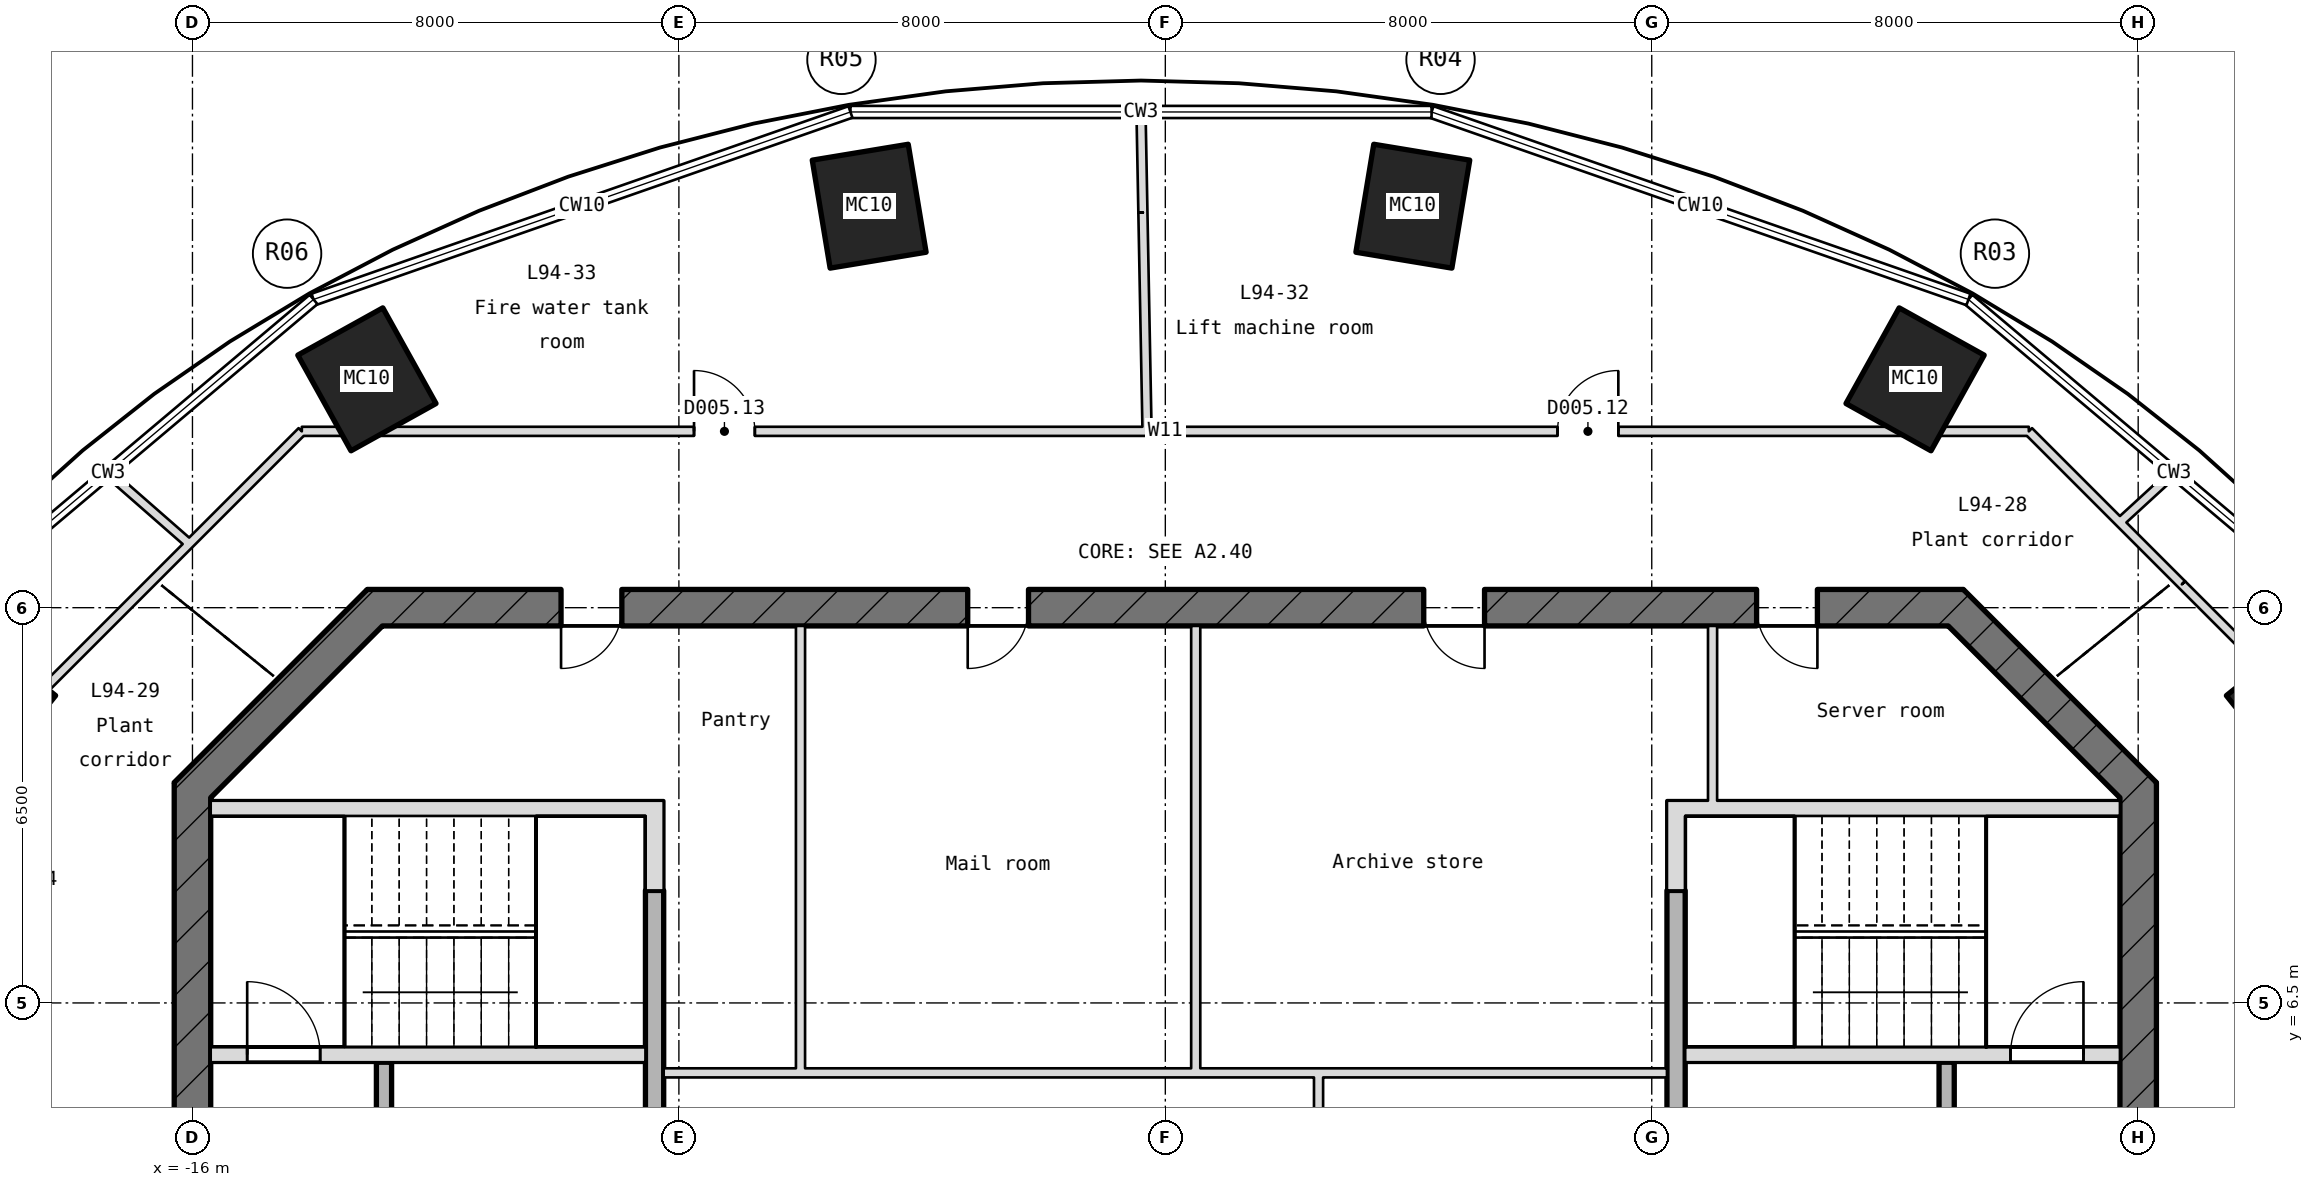
"""IFC4 building model, lengths in metres.
Left out: names, types, materials, properties, quantities, classifications, styles, units other than length and angle.
Written with IfcOpenShell. Run it as: python <this file> out.ifc"""

import sys

from ifc_helpers import new_model, si_unit, direction, frame, frame_2d, origin, origin_2d, place, context, subcontext, project, spatial, rectangle, hollow_rectangle, extrude, element, fill, save


model = new_model("IFC4")
c1 = context("Model", 3, precision=1e-05, world=origin(), true_north=direction((0.0, 1.0)))
c2 = subcontext(c1, "Body", "Model", "MODEL_VIEW")
j1 = project(units=[si_unit("LENGTHUNIT", "METRE"), si_unit("PLANEANGLEUNIT", "RADIAN")], contexts=[c1])
p1 = place(None, origin())
s1 = spatial("IfcSite", under=j1, at=p1, CompositionType="ELEMENT")
p2 = place(p1, origin())
s2 = spatial("IfcBuilding", under=s1, at=p2, CompositionType="ELEMENT")
p3 = place(p2, frame((0.0, 0.0, 418.55)))
s3 = spatial("IfcBuildingStorey", under=s2, at=p3, CompositionType="ELEMENT", Elevation=418.55)
for number, where, z_axis, x_axis in (
    (1, (18.653, 11.494, -0.2), (0.0, 0.0, 1.0), (0.626, -0.78, 0.0)),
    (2, (12.331, 16.755, -0.2), (0.0, 0.0, 1.0), (0.874, -0.486, 0.0)),
    (3, (4.071, 19.603, -0.2), (0.0, 0.0, 1.0), (0.987, -0.163, 0.0)),
    (4, (-4.871, 19.603, -0.2), (0.0, 0.0, 1.0), (0.987, 0.163, 0.0)),
    (5, (-13.131, 16.755, -0.2), (0.0, 0.0, 1.0), (0.874, 0.486, 0.0)),
    (6, (-19.453, 11.494, -0.2), (0.0, 0.0, 1.0), (0.626, 0.78, 0.0)),
):
    element("IfcColumn", number, at=place(p3, frame(where, z_axis=z_axis, x_axis=x_axis)), inside=s3, PredefinedType="COLUMN", context=c2, shape_type="SweptSolid", body=[
        extrude(hollow_rectangle(XDim=1.6, YDim=1.8, WallThickness=0.045, at=origin_2d()), origin(), (0.0, 0.0, 1.0), 4.9),
    ])
p4 = place(p3, frame((16.0, -10.124, -0.2), z_axis=(0.0, 0.0, 1.0), x_axis=(0.0, 1.0, 0.0)))
e7 = element("IfcWall", 7, at=p4, inside=s3, PredefinedType="SHEAR", context=c2, shape_type="SweptSolid", body=[
    extrude(rectangle(XDim=20.249, YDim=0.6, at=frame_2d((10.124, 0.0))), origin(), (0.0, 0.0, 1.0), 4.9),
])
p5 = place(p4, frame((8.924, 0.0, 0.2)))
e8 = element("IfcOpeningElement", 8, at=p5, cuts=e7, PredefinedType="OPENING", context=c2, shape_type="SweptSolid", body=[
    extrude(rectangle(XDim=2.4, YDim=2.1, at=frame_2d((1.2, 1.05))), frame((0.0, 0.31, 0.0), z_axis=(0.0, -1.0, 0.0), x_axis=(1.0, 0.0, 0.0)), (0.0, 0.0, 1.0), 0.62),
])
p6 = place(p4, frame((13.524, 0.0, 0.2)))
e9 = element("IfcOpeningElement", 9, at=p6, cuts=e7, PredefinedType="OPENING", context=c2, shape_type="SweptSolid", body=[
    extrude(rectangle(XDim=1.2, YDim=2.1, at=frame_2d((0.6, 1.05))), frame((0.0, 0.31, 0.0), z_axis=(0.0, -1.0, 0.0), x_axis=(1.0, 0.0, 0.0)), (0.0, 0.0, 1.0), 0.62),
])
p7 = place(p4, frame((2.4, 0.0, 0.2)))
e10 = element("IfcOpeningElement", 10, at=p7, cuts=e7, PredefinedType="OPENING", context=c2, shape_type="SweptSolid", body=[
    extrude(rectangle(XDim=1.2, YDim=2.1, at=frame_2d((0.6, 1.05))), frame((0.0, 0.31, 0.0), z_axis=(0.0, -1.0, 0.0), x_axis=(1.0, 0.0, 0.0)), (0.0, 0.0, 1.0), 0.62),
])
p8 = place(p3, frame((16.088, 9.912, -0.2), z_axis=(0.0, 0.0, 1.0), x_axis=(-0.707106781187, 0.707106781187, 0.0)))
e11 = element("IfcWall", 11, at=p8, inside=s3, PredefinedType="SHEAR", context=c2, shape_type="SweptSolid", body=[
    extrude(rectangle(XDim=4.491, YDim=0.6, at=frame_2d((2.246, 0.0))), origin(), (0.0, 0.0, 1.0), 4.9),
])
p9 = place(p3, frame((13.124, 13.0, -0.2), z_axis=(0.0, 0.0, 1.0), x_axis=(-1.0, 0.0, 0.0)))
e12 = element("IfcWall", 12, at=p9, inside=s3, PredefinedType="SHEAR", context=c2, shape_type="SweptSolid", body=[
    extrude(rectangle(XDim=26.249, YDim=0.6, at=frame_2d((13.124, 0.0))), origin(), (0.0, 0.0, 1.0), 4.9),
])
p10 = place(p9, frame((22.062, 0.0, 0.2)))
e13 = element("IfcOpeningElement", 13, at=p10, cuts=e12, PredefinedType="OPENING", context=c2, shape_type="SweptSolid", body=[
    extrude(rectangle(XDim=1.0, YDim=2.1, at=frame_2d((0.5, 1.05))), frame((0.0, 0.31, 0.0), z_axis=(0.0, -1.0, 0.0), x_axis=(1.0, 0.0, 0.0)), (0.0, 0.0, 1.0), 0.62),
])
p11 = place(p9, frame((15.374, 0.0, 0.2)))
e14 = element("IfcOpeningElement", 14, at=p11, cuts=e12, PredefinedType="OPENING", context=c2, shape_type="SweptSolid", body=[
    extrude(rectangle(XDim=1.0, YDim=2.1, at=frame_2d((0.5, 1.05))), frame((0.0, 0.31, 0.0), z_axis=(0.0, -1.0, 0.0), x_axis=(1.0, 0.0, 0.0)), (0.0, 0.0, 1.0), 0.62),
])
p12 = place(p9, frame((7.874, 0.0, 0.2)))
e15 = element("IfcOpeningElement", 15, at=p12, cuts=e12, PredefinedType="OPENING", context=c2, shape_type="SweptSolid", body=[
    extrude(rectangle(XDim=1.0, YDim=2.1, at=frame_2d((0.5, 1.05))), frame((0.0, 0.31, 0.0), z_axis=(0.0, -1.0, 0.0), x_axis=(1.0, 0.0, 0.0)), (0.0, 0.0, 1.0), 0.62),
])
p13 = place(p9, frame((2.4, 0.0, 0.2)))
e16 = element("IfcOpeningElement", 16, at=p13, cuts=e12, PredefinedType="OPENING", context=c2, shape_type="SweptSolid", body=[
    extrude(rectangle(XDim=1.0, YDim=2.1, at=frame_2d((0.5, 1.05))), frame((0.0, 0.31, 0.0), z_axis=(0.0, -1.0, 0.0), x_axis=(1.0, 0.0, 0.0)), (0.0, 0.0, 1.0), 0.62),
])
p14 = place(p3, frame((-12.912, 13.088, -0.2), z_axis=(0.0, 0.0, 1.0), x_axis=(-0.707106781187, -0.707106781187, 0.0)))
e17 = element("IfcWall", 17, at=p14, inside=s3, PredefinedType="SHEAR", context=c2, shape_type="SweptSolid", body=[
    extrude(rectangle(XDim=4.491, YDim=0.6, at=frame_2d((2.246, 0.0))), origin(), (0.0, 0.0, 1.0), 4.9),
])
p15 = place(p3, frame((-16.0, 10.124, -0.2), z_axis=(0.0, 0.0, 1.0), x_axis=(0.0, -1.0, 0.0)))
e18 = element("IfcWall", 18, at=p15, inside=s3, PredefinedType="SHEAR", context=c2, shape_type="SweptSolid", body=[
    extrude(rectangle(XDim=20.249, YDim=0.6, at=frame_2d((10.124, 0.0))), origin(), (0.0, 0.0, 1.0), 4.9),
])
p16 = place(p15, frame((8.924, 0.0, 0.2)))
e19 = element("IfcOpeningElement", 19, at=p16, cuts=e18, PredefinedType="OPENING", context=c2, shape_type="SweptSolid", body=[
    extrude(rectangle(XDim=2.4, YDim=2.1, at=frame_2d((1.2, 1.05))), frame((0.0, 0.31, 0.0), z_axis=(0.0, -1.0, 0.0), x_axis=(1.0, 0.0, 0.0)), (0.0, 0.0, 1.0), 0.62),
])
p17 = place(p15, frame((5.524, 0.0, 0.2)))
e20 = element("IfcOpeningElement", 20, at=p17, cuts=e18, PredefinedType="OPENING", context=c2, shape_type="SweptSolid", body=[
    extrude(rectangle(XDim=1.2, YDim=2.1, at=frame_2d((0.6, 1.05))), frame((0.0, 0.31, 0.0), z_axis=(0.0, -1.0, 0.0), x_axis=(1.0, 0.0, 0.0)), (0.0, 0.0, 1.0), 0.62),
])
p18 = place(p3, frame((-8.25, 5.35, 0.0), z_axis=(0.0, 0.0, 1.0), x_axis=(1.0, 0.0, 0.0)))
e21 = element("IfcWall", 21, at=p18, inside=s3, PredefinedType="PARTITIONING", context=c2, shape_type="SweptSolid", body=[
    extrude(rectangle(XDim=16.5, YDim=0.15, at=frame_2d((8.25, 0.0))), origin(), (0.0, 0.0, 1.0), 4.7),
])
p19 = place(p3, frame((-15.7, 5.65, -0.2), z_axis=(0.0, 0.0, 1.0), x_axis=(1.0, 0.0, 0.0)))
e22 = element("IfcWall", 22, at=p19, inside=s3, PredefinedType="SHEAR", context=c2, shape_type="SweptSolid", body=[
    extrude(rectangle(XDim=7.15, YDim=0.25, at=frame_2d((3.575, 0.0))), origin(), (0.0, 0.0, 1.0), 4.9),
])
p20 = place(p19, frame((0.6, 0.0, 0.2)))
e23 = element("IfcOpeningElement", 23, at=p20, cuts=e22, PredefinedType="OPENING", context=c2, shape_type="SweptSolid", body=[
    extrude(rectangle(XDim=1.2, YDim=2.1, at=frame_2d((0.6, 1.05))), frame((0.0, 0.135, 0.0), z_axis=(0.0, -1.0, 0.0), x_axis=(1.0, 0.0, 0.0)), (0.0, 0.0, 1.0), 0.27),
])
p21 = place(p3, frame((8.55, 5.65, -0.2), z_axis=(0.0, 0.0, 1.0), x_axis=(1.0, 0.0, 0.0)))
e24 = element("IfcWall", 24, at=p21, inside=s3, PredefinedType="SHEAR", context=c2, shape_type="SweptSolid", body=[
    extrude(rectangle(XDim=7.15, YDim=0.25, at=frame_2d((3.575, 0.0))), origin(), (0.0, 0.0, 1.0), 4.9),
])
p22 = place(p21, frame((5.35, 0.0, 0.2)))
e25 = element("IfcOpeningElement", 25, at=p22, cuts=e24, PredefinedType="OPENING", context=c2, shape_type="SweptSolid", body=[
    extrude(rectangle(XDim=1.2, YDim=2.1, at=frame_2d((0.6, 1.05))), frame((0.0, 0.135, 0.0), z_axis=(0.0, -1.0, 0.0), x_axis=(1.0, 0.0, 0.0)), (0.0, 0.0, 1.0), 0.27),
])
for number, where, z_axis, x_axis in (
    (26, (-15.7, 9.7, -0.2), (0.0, 0.0, 1.0), (1.0, 0.0, 0.0)),
    (27, (8.55, 9.7, -0.2), (0.0, 0.0, 1.0), (1.0, 0.0, 0.0)),
):
    element("IfcWall", number, at=place(p3, frame(where, z_axis=z_axis, x_axis=x_axis)), inside=s3, PredefinedType="SHEAR", context=c2, shape_type="SweptSolid", body=[
        extrude(rectangle(XDim=7.15, YDim=0.25, at=frame_2d((3.575, 0.0))), origin(), (0.0, 0.0, 1.0), 4.9),
    ])
p23 = place(p3, frame((-12.85, 2.475, 0.0), z_axis=(0.0, 0.0, 1.0), x_axis=(0.0, 1.0, 0.0)))
e28 = element("IfcWall", 28, at=p23, inside=s3, PredefinedType="STANDARD", context=c2, shape_type="SweptSolid", body=[
    extrude(rectangle(XDim=3.05, YDim=0.25, at=frame_2d((1.525, 0.0))), origin(), (0.0, 0.0, 1.0), 4.7),
])
p24 = place(p3, frame((-8.4, 2.5, -0.2), z_axis=(0.0, 0.0, 1.0), x_axis=(0.0, 1.0, 0.0)))
e29 = element("IfcWall", 29, at=p24, inside=s3, PredefinedType="SHEAR", context=c2, shape_type="SweptSolid", body=[
    extrude(rectangle(XDim=5.85, YDim=0.3, at=frame_2d((2.925, 0.0))), origin(), (0.0, 0.0, 1.0), 4.9),
])
p25 = place(p3, frame((-8.4, 8.35, -0.2), z_axis=(0.0, 0.0, 1.0), x_axis=(0.0, 1.0, 0.0)))
e30 = element("IfcWall", 30, at=p25, inside=s3, PredefinedType="SHEAR", context=c2, shape_type="SweptSolid", body=[
    extrude(rectangle(XDim=1.475, YDim=0.3, at=frame_2d((0.737, 0.0))), origin(), (0.0, 0.0, 1.0), 4.9),
])
for number, where, z_axis, x_axis in (
    (31, (-6.0, 5.425, 0.0), (0.0, 0.0, 1.0), (0.0, 1.0, 0.0)),
    (32, (0.5, 5.425, 0.0), (0.0, 0.0, 1.0), (0.0, 1.0, 0.0)),
):
    element("IfcWall", number, at=place(p3, frame(where, z_axis=z_axis, x_axis=x_axis)), inside=s3, PredefinedType="PARTITIONING", context=c2, shape_type="SweptSolid", body=[
        extrude(rectangle(XDim=7.275, YDim=0.15, at=frame_2d((3.637, 0.0))), origin(), (0.0, 0.0, 1.0), 4.7),
    ])
p26 = place(p3, frame((2.52, 2.5, 0.0), z_axis=(0.0, 0.0, 1.0), x_axis=(0.0, 1.0, 0.0)))
e33 = element("IfcWall", 33, at=p26, inside=s3, PredefinedType="PARTITIONING", context=c2, shape_type="SweptSolid", body=[
    extrude(rectangle(XDim=2.775, YDim=0.15, at=frame_2d((1.387, 0.0))), origin(), (0.0, 0.0, 1.0), 4.7),
])
p27 = place(p3, frame((8.4, 2.5, -0.2), z_axis=(0.0, 0.0, 1.0), x_axis=(0.0, 1.0, 0.0)))
e34 = element("IfcWall", 34, at=p27, inside=s3, PredefinedType="SHEAR", context=c2, shape_type="SweptSolid", body=[
    extrude(rectangle(XDim=5.85, YDim=0.3, at=frame_2d((2.925, 0.0))), origin(), (0.0, 0.0, 1.0), 4.9),
])
p28 = place(p3, frame((8.4, 8.35, -0.2), z_axis=(0.0, 0.0, 1.0), x_axis=(0.0, 1.0, 0.0)))
e35 = element("IfcWall", 35, at=p28, inside=s3, PredefinedType="SHEAR", context=c2, shape_type="SweptSolid", body=[
    extrude(rectangle(XDim=1.475, YDim=0.3, at=frame_2d((0.737, 0.0))), origin(), (0.0, 0.0, 1.0), 4.9),
])
p29 = place(p3, frame((9.0, 9.825, 0.0), z_axis=(0.0, 0.0, 1.0), x_axis=(0.0, 1.0, 0.0)))
e36 = element("IfcWall", 36, at=p29, inside=s3, PredefinedType="PARTITIONING", context=c2, shape_type="SweptSolid", body=[
    extrude(rectangle(XDim=2.875, YDim=0.15, at=frame_2d((1.438, 0.0))), origin(), (0.0, 0.0, 1.0), 4.7),
])
p30 = place(p3, frame((12.85, 2.475, 0.0), z_axis=(0.0, 0.0, 1.0), x_axis=(0.0, 1.0, 0.0)))
e37 = element("IfcWall", 37, at=p30, inside=s3, PredefinedType="STANDARD", context=c2, shape_type="SweptSolid", body=[
    extrude(rectangle(XDim=3.05, YDim=0.25, at=frame_2d((1.525, 0.0))), origin(), (0.0, 0.0, 1.0), 4.7),
])
p31 = place(p3, frame((-14.201, 15.9, 0.0), z_axis=(0.0, 0.0, 1.0), x_axis=(1.0, 0.0, 0.0)))
e38 = element("IfcWall", 38, at=p31, inside=s3, PredefinedType="PARTITIONING", context=c2, shape_type="SweptSolid", body=[
    extrude(rectangle(XDim=28.403, YDim=0.15, at=frame_2d((14.201, 0.0))), origin(), (0.0, 0.0, 1.0), 4.7),
])
p32 = place(p31, frame((20.652, 0.0, 0.0)))
e39 = element("IfcOpeningElement", 39, at=p32, cuts=e38, PredefinedType="OPENING", context=c2, shape_type="SweptSolid", body=[
    extrude(rectangle(XDim=1.0, YDim=2.1, at=frame_2d((0.5, 1.05))), frame((0.0, 0.085, 0.0), z_axis=(0.0, -1.0, 0.0), x_axis=(1.0, 0.0, 0.0)), (0.0, 0.0, 1.0), 0.17),
])
p33 = place(p31, frame((6.45, 0.0, 0.0)))
e40 = element("IfcOpeningElement", 40, at=p33, cuts=e38, PredefinedType="OPENING", context=c2, shape_type="SweptSolid", body=[
    extrude(rectangle(XDim=1.0, YDim=2.1, at=frame_2d((0.5, 1.05))), frame((0.0, 0.085, 0.0), z_axis=(0.0, -1.0, 0.0), x_axis=(1.0, 0.0, 0.0)), (0.0, 0.0, 1.0), 0.17),
])
p34 = place(p3, frame((15.698, 14.404, 0.0), z_axis=(0.0, 0.0, 1.0), x_axis=(0.736966436557, 0.67592933905, 0.0)))
e41 = element("IfcWall", 41, at=p34, inside=s3, PredefinedType="PARTITIONING", context=c2, shape_type="SweptSolid", body=[
    extrude(rectangle(XDim=1.188, YDim=0.15, at=frame_2d((0.594, 0.0))), origin(), (0.0, 0.0, 1.0), 4.7),
])
p35 = place(p3, frame((-18.9, 11.201, 0.0), z_axis=(0.0, 0.0, 1.0), x_axis=(0.707106781187, 0.707106781187, 0.0)))
e42 = element("IfcWall", 42, at=p35, inside=s3, PredefinedType="PARTITIONING", context=c2, shape_type="SweptSolid", body=[
    extrude(rectangle(XDim=3.998, YDim=0.15, at=frame_2d((1.999, 0.0))), origin(), (0.0, 0.0, 1.0), 4.7),
])
p36 = place(p3, frame((-16.073, 14.029, 0.0), z_axis=(0.0, 0.0, 1.0), x_axis=(0.707106781187, 0.707106781187, 0.0)))
e43 = element("IfcWall", 43, at=p36, inside=s3, PredefinedType="PARTITIONING", context=c2, shape_type="SweptSolid", body=[
    extrude(rectangle(XDim=2.646, YDim=0.15, at=frame_2d((1.323, 0.0))), origin(), (0.0, 0.0, 1.0), 4.238),
])
p37 = place(p3, frame((-0.301, 15.9, 0.0), z_axis=(0.0, 0.0, 1.0), x_axis=(-0.018863287148, 0.99982207237, 0.0)))
e44 = element("IfcWall", 44, at=p37, inside=s3, PredefinedType="PARTITIONING", context=c2, shape_type="SweptSolid", body=[
    extrude(rectangle(XDim=3.598, YDim=0.15, at=frame_2d((1.799, 0.0))), origin(), (0.0, 0.0, 1.0), 4.347),
])
p38 = place(p3, frame((-0.369, 19.497, 0.0), z_axis=(0.0, 0.0, 1.0), x_axis=(-0.018963136695, 0.999820183556, 0.0)))
e45 = element("IfcWall", 45, at=p38, inside=s3, PredefinedType="PARTITIONING", context=c2, shape_type="SweptSolid", body=[
    extrude(rectangle(XDim=1.635, YDim=0.15, at=frame_2d((0.817, 0.0))), origin(), (0.0, 0.0, 1.0), 4.7),
])
p39 = place(p3, frame((18.412, 11.689, 0.0), z_axis=(0.0, 0.0, 1.0), x_axis=(-0.707055846068, 0.707157712636, 0.0)))
e46 = element("IfcWall", 46, at=p39, inside=s3, PredefinedType="PARTITIONING", context=c2, shape_type="SweptSolid", body=[
    extrude(rectangle(XDim=2.397, YDim=0.15, at=frame_2d((1.198, 0.0))), origin(), (0.0, 0.0, 1.0), 4.238),
])
p40 = place(p3, frame((16.718, 13.384, 0.0), z_axis=(0.0, 0.0, 1.0), x_axis=(-0.707072476431, 0.707141084278, 0.0)))
e47 = element("IfcWall", 47, at=p40, inside=s3, PredefinedType="PARTITIONING", context=c2, shape_type="SweptSolid", body=[
    extrude(rectangle(XDim=3.559, YDim=0.15, at=frame_2d((1.779, 0.0))), origin(), (0.0, 0.0, 1.0), 4.7),
])
p41 = place(p3, frame((-16.051, 14.05, 0.0), z_axis=(0.0, 0.0, 1.0), x_axis=(-0.75245614782, 0.658642350299, 0.0)))
e48 = element("IfcWall", 48, at=p41, inside=s3, PredefinedType="PARTITIONING", context=c2, shape_type="SweptSolid", body=[
    extrude(rectangle(XDim=1.757, YDim=0.15, at=frame_2d((0.878, 0.0))), origin(), (0.0, 0.0, 1.0), 4.7),
])
p42 = place(p20, origin())
e49 = element("IfcDoor", 49, at=p42, inside=s3, OperationType="SINGLE_SWING_RIGHT", PredefinedType="DOOR", context=c2, shape_type="SweptSolid", body=[
    extrude(rectangle(XDim=1.2, YDim=2.1, at=frame_2d((0.6, 1.05))), frame((0.0, 0.025, 0.0), z_axis=(0.0, -1.0, 0.0), x_axis=(1.0, 0.0, 0.0)), (0.0, 0.0, 1.0), 0.05),
])
fill(e23, e49)
p43 = place(p22, origin())
e50 = element("IfcDoor", 50, at=p43, inside=s3, OperationType="SINGLE_SWING_RIGHT", PredefinedType="DOOR", context=c2, shape_type="SweptSolid", body=[
    extrude(rectangle(XDim=1.2, YDim=2.1, at=frame_2d((0.6, 1.05))), frame((0.0, 0.025, 0.0), z_axis=(0.0, -1.0, 0.0), x_axis=(1.0, 0.0, 0.0)), (0.0, 0.0, 1.0), 0.05),
])
fill(e25, e50)
p44 = place(p10, origin())
e51 = element("IfcDoor", 51, at=p44, inside=s3, OperationType="SINGLE_SWING_RIGHT", PredefinedType="DOOR", context=c2, shape_type="SweptSolid", body=[
    extrude(rectangle(XDim=1.0, YDim=2.1, at=frame_2d((0.5, 1.05))), frame((0.0, 0.025, 0.0), z_axis=(0.0, -1.0, 0.0), x_axis=(1.0, 0.0, 0.0)), (0.0, 0.0, 1.0), 0.05),
])
fill(e13, e51)
p45 = place(p11, origin())
e52 = element("IfcDoor", 52, at=p45, inside=s3, OperationType="SINGLE_SWING_RIGHT", PredefinedType="DOOR", context=c2, shape_type="SweptSolid", body=[
    extrude(rectangle(XDim=1.0, YDim=2.1, at=frame_2d((0.5, 1.05))), frame((0.0, 0.025, 0.0), z_axis=(0.0, -1.0, 0.0), x_axis=(1.0, 0.0, 0.0)), (0.0, 0.0, 1.0), 0.05),
])
fill(e14, e52)
p46 = place(p12, origin())
e53 = element("IfcDoor", 53, at=p46, inside=s3, OperationType="SINGLE_SWING_RIGHT", PredefinedType="DOOR", context=c2, shape_type="SweptSolid", body=[
    extrude(rectangle(XDim=1.0, YDim=2.1, at=frame_2d((0.5, 1.05))), frame((0.0, 0.025, 0.0), z_axis=(0.0, -1.0, 0.0), x_axis=(1.0, 0.0, 0.0)), (0.0, 0.0, 1.0), 0.05),
])
fill(e15, e53)
p47 = place(p13, origin())
e54 = element("IfcDoor", 54, at=p47, inside=s3, OperationType="SINGLE_SWING_RIGHT", PredefinedType="DOOR", context=c2, shape_type="SweptSolid", body=[
    extrude(rectangle(XDim=1.0, YDim=2.1, at=frame_2d((0.5, 1.05))), frame((0.0, 0.025, 0.0), z_axis=(0.0, -1.0, 0.0), x_axis=(1.0, 0.0, 0.0)), (0.0, 0.0, 1.0), 0.05),
])
fill(e16, e54)
p48 = place(p32, origin())
e55 = element("IfcDoor", 55, at=p48, inside=s3, OperationType="SINGLE_SWING_RIGHT", PredefinedType="DOOR", context=c2, shape_type="SweptSolid", body=[
    extrude(rectangle(XDim=1.0, YDim=2.1, at=frame_2d((0.5, 1.05))), frame((0.0, 0.025, 0.0), z_axis=(0.0, -1.0, 0.0), x_axis=(1.0, 0.0, 0.0)), (0.0, 0.0, 1.0), 0.05),
])
fill(e39, e55)
p49 = place(p33, origin())
e56 = element("IfcDoor", 56, at=p49, inside=s3, OperationType="SINGLE_SWING_RIGHT", PredefinedType="DOOR", context=c2, shape_type="SweptSolid", body=[
    extrude(rectangle(XDim=1.0, YDim=2.1, at=frame_2d((0.5, 1.05))), frame((0.0, 0.025, 0.0), z_axis=(0.0, -1.0, 0.0), x_axis=(1.0, 0.0, 0.0)), (0.0, 0.0, 1.0), 0.05),
])
fill(e40, e56)
save(model, sys.argv[1])
